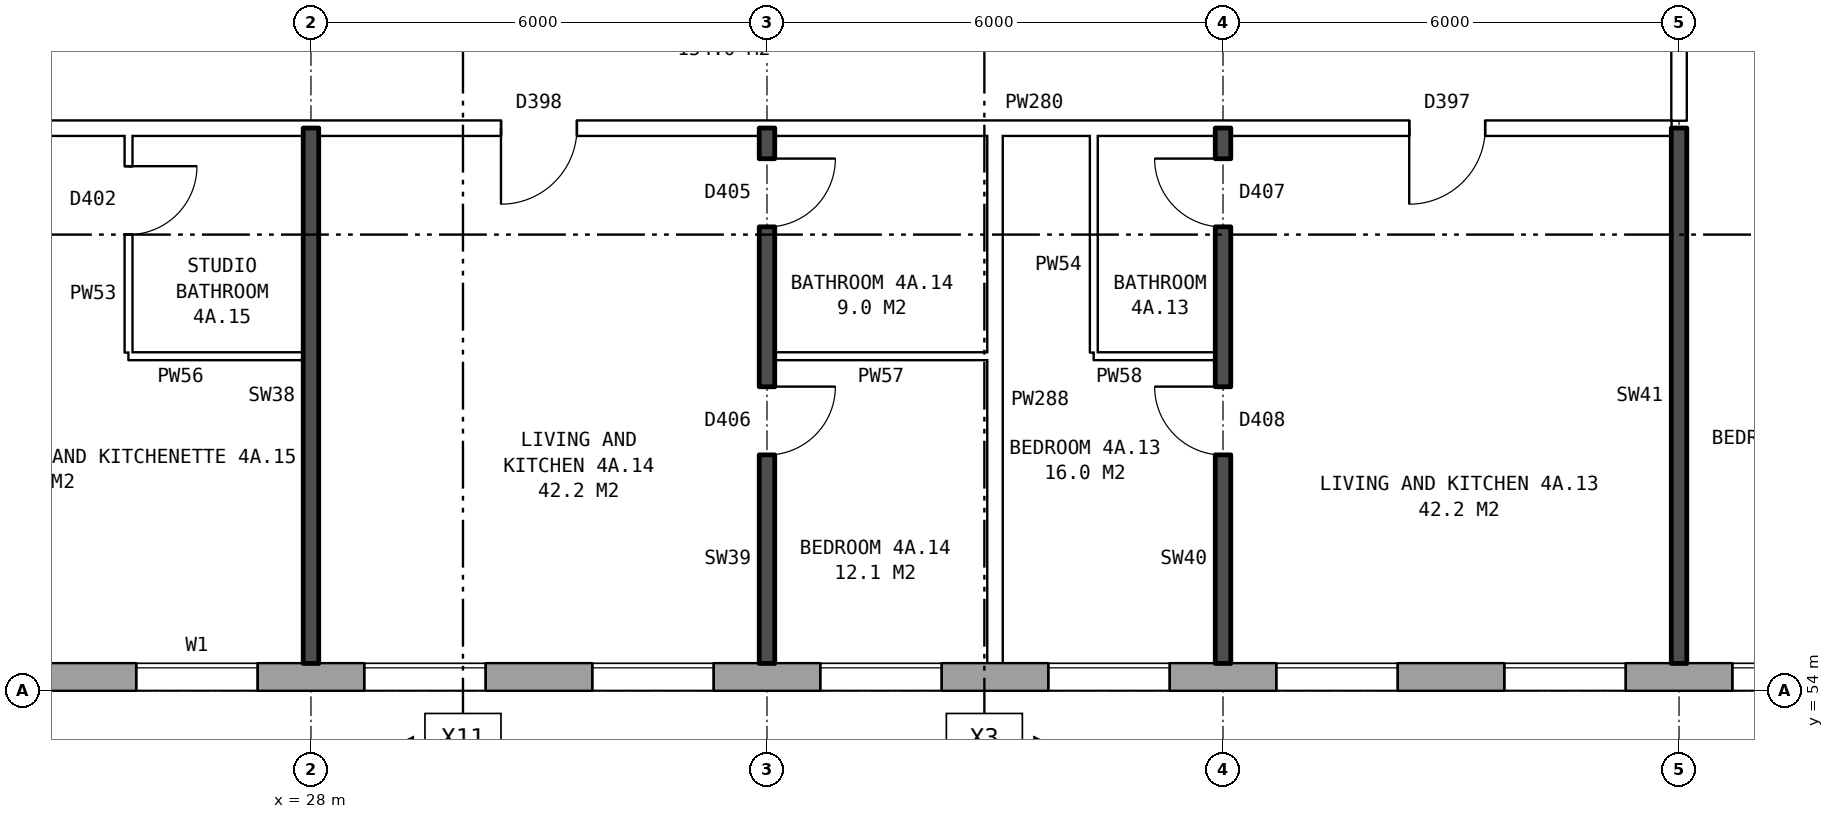
"""IFC4 building model, lengths in metres.
Left out: names, types, materials, properties, quantities, classifications, styles, units other than length and angle.
Written with IfcOpenShell. Run it as: python <this file> out.ifc"""

import sys

from ifc_helpers import new_model, si_unit, direction, frame, frame_2d, origin, place, context, subcontext, project, spatial, rectangle, extrude, element, fill, save


model = new_model("IFC4")
c1 = context("Model", 3, precision=1e-05, world=origin(), true_north=direction((0.0, 1.0)))
c2 = subcontext(c1, "Body", "Model", "MODEL_VIEW")
j1 = project(units=[si_unit("LENGTHUNIT", "METRE"), si_unit("PLANEANGLEUNIT", "RADIAN")], contexts=[c1])
p1 = place(None, origin())
s1 = spatial("IfcSite", under=j1, at=p1, CompositionType="ELEMENT")
p2 = place(p1, origin())
s2 = spatial("IfcBuilding", under=s1, at=p2, CompositionType="ELEMENT")
p3 = place(p2, frame((0.0, 0.0, 19.5)))
s3 = spatial("IfcBuildingStorey", under=s2, at=p3, CompositionType="ELEMENT", Elevation=19.5)
p4 = place(p3, frame((22.825, 54.18, 0.0), z_axis=(0.0, 0.0, 1.0), x_axis=(1.0, 0.0, 0.0)))
e1 = element("IfcWall", 1, at=p4, inside=s3, PredefinedType="STANDARD", context=c2, shape_type="SweptSolid", body=[
    extrude(rectangle(XDim=50.101, YDim=0.36, at=frame_2d((25.05, 0.0))), origin(), (0.0, 0.0, 1.0), 2.85),
])
p5 = place(p4, frame((2.875, 0.0, 0.8)))
e2 = element("IfcOpeningElement", 2, at=p5, cuts=e1, PredefinedType="OPENING", context=c2, shape_type="SweptSolid", body=[
    extrude(rectangle(XDim=1.6, YDim=1.8, at=frame_2d((0.8, 0.9))), frame((0.0, 0.19, 0.0), z_axis=(0.0, -1.0, 0.0), x_axis=(1.0, 0.0, 0.0)), (0.0, 0.0, 1.0), 0.38),
])
p6 = place(p4, frame((5.875, 0.0, 0.8)))
e3 = element("IfcOpeningElement", 3, at=p6, cuts=e1, PredefinedType="OPENING", context=c2, shape_type="SweptSolid", body=[
    extrude(rectangle(XDim=1.6, YDim=1.8, at=frame_2d((0.8, 0.9))), frame((0.0, 0.19, 0.0), z_axis=(0.0, -1.0, 0.0), x_axis=(1.0, 0.0, 0.0)), (0.0, 0.0, 1.0), 0.38),
])
p7 = place(p4, frame((8.875, 0.0, 0.8)))
e4 = element("IfcOpeningElement", 4, at=p7, cuts=e1, PredefinedType="OPENING", context=c2, shape_type="SweptSolid", body=[
    extrude(rectangle(XDim=1.6, YDim=1.8, at=frame_2d((0.8, 0.9))), frame((0.0, 0.19, 0.0), z_axis=(0.0, -1.0, 0.0), x_axis=(1.0, 0.0, 0.0)), (0.0, 0.0, 1.0), 0.38),
])
p8 = place(p4, frame((11.875, 0.0, 0.8)))
e5 = element("IfcOpeningElement", 5, at=p8, cuts=e1, PredefinedType="OPENING", context=c2, shape_type="SweptSolid", body=[
    extrude(rectangle(XDim=1.6, YDim=1.8, at=frame_2d((0.8, 0.9))), frame((0.0, 0.19, 0.0), z_axis=(0.0, -1.0, 0.0), x_axis=(1.0, 0.0, 0.0)), (0.0, 0.0, 1.0), 0.38),
])
p9 = place(p4, frame((14.875, 0.0, 0.8)))
e6 = element("IfcOpeningElement", 6, at=p9, cuts=e1, PredefinedType="OPENING", context=c2, shape_type="SweptSolid", body=[
    extrude(rectangle(XDim=1.6, YDim=1.8, at=frame_2d((0.8, 0.9))), frame((0.0, 0.19, 0.0), z_axis=(0.0, -1.0, 0.0), x_axis=(1.0, 0.0, 0.0)), (0.0, 0.0, 1.0), 0.38),
])
p10 = place(p4, frame((17.875, 0.0, 0.8)))
e7 = element("IfcOpeningElement", 7, at=p10, cuts=e1, PredefinedType="OPENING", context=c2, shape_type="SweptSolid", body=[
    extrude(rectangle(XDim=1.6, YDim=1.8, at=frame_2d((0.8, 0.9))), frame((0.0, 0.19, 0.0), z_axis=(0.0, -1.0, 0.0), x_axis=(1.0, 0.0, 0.0)), (0.0, 0.0, 1.0), 0.38),
])
p11 = place(p4, frame((20.875, 0.0, 0.8)))
e8 = element("IfcOpeningElement", 8, at=p11, cuts=e1, PredefinedType="OPENING", context=c2, shape_type="SweptSolid", body=[
    extrude(rectangle(XDim=1.6, YDim=1.8, at=frame_2d((0.8, 0.9))), frame((0.0, 0.19, 0.0), z_axis=(0.0, -1.0, 0.0), x_axis=(1.0, 0.0, 0.0)), (0.0, 0.0, 1.0), 0.38),
])
p12 = place(p4, frame((23.875, 0.0, 0.8)))
e9 = element("IfcOpeningElement", 9, at=p12, cuts=e1, PredefinedType="OPENING", context=c2, shape_type="SweptSolid", body=[
    extrude(rectangle(XDim=1.6, YDim=1.8, at=frame_2d((0.8, 0.9))), frame((0.0, 0.19, 0.0), z_axis=(0.0, -1.0, 0.0), x_axis=(1.0, 0.0, 0.0)), (0.0, 0.0, 1.0), 0.38),
])
p13 = place(p4, frame((26.875, 0.0, 0.8)))
e10 = element("IfcOpeningElement", 10, at=p13, cuts=e1, PredefinedType="OPENING", context=c2, shape_type="SweptSolid", body=[
    extrude(rectangle(XDim=1.6, YDim=1.8, at=frame_2d((0.8, 0.9))), frame((0.0, 0.19, 0.0), z_axis=(0.0, -1.0, 0.0), x_axis=(1.0, 0.0, 0.0)), (0.0, 0.0, 1.0), 0.38),
])
p14 = place(p4, frame((29.875, 0.0, 0.8)))
e11 = element("IfcOpeningElement", 11, at=p14, cuts=e1, PredefinedType="OPENING", context=c2, shape_type="SweptSolid", body=[
    extrude(rectangle(XDim=1.6, YDim=1.8, at=frame_2d((0.8, 0.9))), frame((0.0, 0.19, 0.0), z_axis=(0.0, -1.0, 0.0), x_axis=(1.0, 0.0, 0.0)), (0.0, 0.0, 1.0), 0.38),
])
p15 = place(p4, frame((32.875, 0.0, 0.8)))
e12 = element("IfcOpeningElement", 12, at=p15, cuts=e1, PredefinedType="OPENING", context=c2, shape_type="SweptSolid", body=[
    extrude(rectangle(XDim=1.6, YDim=1.8, at=frame_2d((0.8, 0.9))), frame((0.0, 0.19, 0.0), z_axis=(0.0, -1.0, 0.0), x_axis=(1.0, 0.0, 0.0)), (0.0, 0.0, 1.0), 0.38),
])
p16 = place(p4, frame((35.875, 0.0, 0.8)))
e13 = element("IfcOpeningElement", 13, at=p16, cuts=e1, PredefinedType="OPENING", context=c2, shape_type="SweptSolid", body=[
    extrude(rectangle(XDim=1.6, YDim=1.8, at=frame_2d((0.8, 0.9))), frame((0.0, 0.19, 0.0), z_axis=(0.0, -1.0, 0.0), x_axis=(1.0, 0.0, 0.0)), (0.0, 0.0, 1.0), 0.38),
])
p17 = place(p4, frame((38.875, 0.0, 0.8)))
e14 = element("IfcOpeningElement", 14, at=p17, cuts=e1, PredefinedType="OPENING", context=c2, shape_type="SweptSolid", body=[
    extrude(rectangle(XDim=1.6, YDim=1.8, at=frame_2d((0.8, 0.9))), frame((0.0, 0.19, 0.0), z_axis=(0.0, -1.0, 0.0), x_axis=(1.0, 0.0, 0.0)), (0.0, 0.0, 1.0), 0.38),
])
p18 = place(p4, frame((41.875, 0.0, 0.8)))
e15 = element("IfcOpeningElement", 15, at=p18, cuts=e1, PredefinedType="OPENING", context=c2, shape_type="SweptSolid", body=[
    extrude(rectangle(XDim=1.6, YDim=1.8, at=frame_2d((0.8, 0.9))), frame((0.0, 0.19, 0.0), z_axis=(0.0, -1.0, 0.0), x_axis=(1.0, 0.0, 0.0)), (0.0, 0.0, 1.0), 0.38),
])
p19 = place(p4, frame((44.875, 0.0, 0.8)))
e16 = element("IfcOpeningElement", 16, at=p19, cuts=e1, PredefinedType="OPENING", context=c2, shape_type="SweptSolid", body=[
    extrude(rectangle(XDim=1.6, YDim=1.8, at=frame_2d((0.8, 0.9))), frame((0.0, 0.19, 0.0), z_axis=(0.0, -1.0, 0.0), x_axis=(1.0, 0.0, 0.0)), (0.0, 0.0, 1.0), 0.38),
])
p20 = place(p4, frame((47.375, 0.0, 0.8)))
e17 = element("IfcOpeningElement", 17, at=p20, cuts=e1, PredefinedType="OPENING", context=c2, shape_type="SweptSolid", body=[
    extrude(rectangle(XDim=1.0, YDim=1.5, at=frame_2d((0.5, 0.75))), frame((0.0, 0.19, 0.0), z_axis=(0.0, -1.0, 0.0), x_axis=(1.0, 0.0, 0.0)), (0.0, 0.0, 1.0), 0.38),
])
p21 = place(p4, frame((48.675, 0.0, 0.8)))
e18 = element("IfcOpeningElement", 18, at=p21, cuts=e1, PredefinedType="OPENING", context=c2, shape_type="SweptSolid", body=[
    extrude(rectangle(XDim=0.6, YDim=0.9, at=frame_2d((0.3, 0.45))), frame((0.0, 0.19, 0.0), z_axis=(0.0, -1.0, 0.0), x_axis=(1.0, 0.0, 0.0)), (0.0, 0.0, 1.0), 0.38),
])
p22 = place(p3, frame((25.6, 58.4, 0.0), z_axis=(0.0, 0.0, 1.0), x_axis=(1.0, 0.0, 0.0)))
e19 = element("IfcWall", 19, at=p22, inside=s3, PredefinedType="PARTITIONING", context=c2, shape_type="SweptSolid", body=[
    extrude(rectangle(XDim=2.3, YDim=0.1, at=frame_2d((1.15, 0.0))), origin(), (0.0, 0.0, 1.0), 2.85),
])
p23 = place(p3, frame((34.1, 58.4, 0.0), z_axis=(0.0, 0.0, 1.0), x_axis=(1.0, 0.0, 0.0)))
e20 = element("IfcWall", 20, at=p23, inside=s3, PredefinedType="PARTITIONING", context=c2, shape_type="SweptSolid", body=[
    extrude(rectangle(XDim=2.8, YDim=0.1, at=frame_2d((1.4, 0.0))), origin(), (0.0, 0.0, 1.0), 2.85),
])
p24 = place(p3, frame((38.3, 58.4, 0.0), z_axis=(0.0, 0.0, 1.0), x_axis=(1.0, 0.0, 0.0)))
e21 = element("IfcWall", 21, at=p24, inside=s3, PredefinedType="PARTITIONING", context=c2, shape_type="SweptSolid", body=[
    extrude(rectangle(XDim=1.6, YDim=0.1, at=frame_2d((0.8, 0.0))), origin(), (0.0, 0.0, 1.0), 2.85),
])
p25 = place(p3, frame((20.11, 61.4, 0.0), z_axis=(0.0, 0.0, 1.0), x_axis=(1.0, 0.0, 0.0)))
e22 = element("IfcWall", 22, at=p25, inside=s3, PredefinedType="PARTITIONING", context=c2, shape_type="SweptSolid", body=[
    extrude(rectangle(XDim=25.79, YDim=0.2, at=frame_2d((12.895, 0.0))), origin(), (0.0, 0.0, 1.0), 2.85),
])
p26 = place(p25, frame((22.34, 0.0, 0.0)))
e23 = element("IfcOpeningElement", 23, at=p26, cuts=e22, PredefinedType="OPENING", context=c2, shape_type="SweptSolid", body=[
    extrude(rectangle(XDim=1.0, YDim=2.1, at=frame_2d((0.5, 1.05))), frame((0.0, 0.11, 0.0), z_axis=(0.0, -1.0, 0.0), x_axis=(1.0, 0.0, 0.0)), (0.0, 0.0, 1.0), 0.22),
])
p27 = place(p25, frame((10.39, 0.0, 0.0)))
e24 = element("IfcOpeningElement", 24, at=p27, cuts=e22, PredefinedType="OPENING", context=c2, shape_type="SweptSolid", body=[
    extrude(rectangle(XDim=1.0, YDim=2.1, at=frame_2d((0.5, 1.05))), frame((0.0, 0.11, 0.0), z_axis=(0.0, -1.0, 0.0), x_axis=(1.0, 0.0, 0.0)), (0.0, 0.0, 1.0), 0.22),
])
p28 = place(p25, frame((2.245, 0.0, 0.0)))
e25 = element("IfcOpeningElement", 25, at=p28, cuts=e22, PredefinedType="OPENING", context=c2, shape_type="SweptSolid", body=[
    extrude(rectangle(XDim=1.0, YDim=2.1, at=frame_2d((0.5, 1.05))), frame((0.0, 0.11, 0.0), z_axis=(0.0, -1.0, 0.0), x_axis=(1.0, 0.0, 0.0)), (0.0, 0.0, 1.0), 0.22),
])
p29 = place(p3, frame((25.6, 58.45, 0.0), z_axis=(0.0, 0.0, 1.0), x_axis=(0.0, 1.0, 0.0)))
e26 = element("IfcWall", 26, at=p29, inside=s3, PredefinedType="PARTITIONING", context=c2, shape_type="SweptSolid", body=[
    extrude(rectangle(XDim=2.85, YDim=0.1, at=frame_2d((1.425, 0.0))), origin(), (0.0, 0.0, 1.0), 2.85),
])
p30 = place(p29, frame((1.55, 0.0, 0.0)))
e27 = element("IfcOpeningElement", 27, at=p30, cuts=e26, PredefinedType="OPENING", context=c2, shape_type="SweptSolid", body=[
    extrude(rectangle(XDim=0.9, YDim=2.1, at=frame_2d((0.45, 1.05))), frame((0.0, 0.06, 0.0), z_axis=(0.0, -1.0, 0.0), x_axis=(1.0, 0.0, 0.0)), (0.0, 0.0, 1.0), 0.12),
])
p31 = place(p3, frame((28.0, 54.36, 0.0), z_axis=(0.0, 0.0, 1.0), x_axis=(0.0, 1.0, 0.0)))
e28 = element("IfcWall", 28, at=p31, inside=s3, PredefinedType="SOLIDWALL", context=c2, shape_type="SweptSolid", body=[
    extrude(rectangle(XDim=7.04, YDim=0.2, at=frame_2d((3.52, 0.0))), origin(), (0.0, 0.0, 1.0), 2.85),
])
p32 = place(p3, frame((34.0, 54.36, 0.0), z_axis=(0.0, 0.0, 1.0), x_axis=(0.0, 1.0, 0.0)))
e29 = element("IfcWall", 29, at=p32, inside=s3, PredefinedType="SOLIDWALL", context=c2, shape_type="SweptSolid", body=[
    extrude(rectangle(XDim=7.04, YDim=0.2, at=frame_2d((3.52, 0.0))), origin(), (0.0, 0.0, 1.0), 2.85),
])
p33 = place(p32, frame((2.74, 0.0, 0.0)))
e30 = element("IfcOpeningElement", 30, at=p33, cuts=e29, PredefinedType="OPENING", context=c2, shape_type="SweptSolid", body=[
    extrude(rectangle(XDim=0.9, YDim=2.1, at=frame_2d((0.45, 1.05))), frame((0.0, 0.11, 0.0), z_axis=(0.0, -1.0, 0.0), x_axis=(1.0, 0.0, 0.0)), (0.0, 0.0, 1.0), 0.22),
])
p34 = place(p32, frame((5.74, 0.0, 0.0)))
e31 = element("IfcOpeningElement", 31, at=p34, cuts=e29, PredefinedType="OPENING", context=c2, shape_type="SweptSolid", body=[
    extrude(rectangle(XDim=0.9, YDim=2.1, at=frame_2d((0.45, 1.05))), frame((0.0, 0.11, 0.0), z_axis=(0.0, -1.0, 0.0), x_axis=(1.0, 0.0, 0.0)), (0.0, 0.0, 1.0), 0.22),
])
p35 = place(p3, frame((37.0, 54.36, 0.0), z_axis=(0.0, 0.0, 1.0), x_axis=(0.0, 1.0, 0.0)))
e32 = element("IfcWall", 32, at=p35, inside=s3, PredefinedType="PARTITIONING", context=c2, shape_type="SweptSolid", body=[
    extrude(rectangle(XDim=6.94, YDim=0.2, at=frame_2d((3.47, 0.0))), origin(), (0.0, 0.0, 1.0), 2.85),
])
p36 = place(p3, frame((38.3, 58.45, 0.0), z_axis=(0.0, 0.0, 1.0), x_axis=(0.0, 1.0, 0.0)))
e33 = element("IfcWall", 33, at=p36, inside=s3, PredefinedType="PARTITIONING", context=c2, shape_type="SweptSolid", body=[
    extrude(rectangle(XDim=2.85, YDim=0.1, at=frame_2d((1.425, 0.0))), origin(), (0.0, 0.0, 1.0), 2.85),
])
p37 = place(p3, frame((40.0, 54.36, 0.0), z_axis=(0.0, 0.0, 1.0), x_axis=(0.0, 1.0, 0.0)))
e34 = element("IfcWall", 34, at=p37, inside=s3, PredefinedType="SOLIDWALL", context=c2, shape_type="SweptSolid", body=[
    extrude(rectangle(XDim=7.04, YDim=0.2, at=frame_2d((3.52, 0.0))), origin(), (0.0, 0.0, 1.0), 2.85),
])
p38 = place(p37, frame((2.74, 0.0, 0.0)))
e35 = element("IfcOpeningElement", 35, at=p38, cuts=e34, PredefinedType="OPENING", context=c2, shape_type="SweptSolid", body=[
    extrude(rectangle(XDim=0.9, YDim=2.1, at=frame_2d((0.45, 1.05))), frame((0.0, 0.11, 0.0), z_axis=(0.0, -1.0, 0.0), x_axis=(1.0, 0.0, 0.0)), (0.0, 0.0, 1.0), 0.22),
])
p39 = place(p37, frame((5.74, 0.0, 0.0)))
e36 = element("IfcOpeningElement", 36, at=p39, cuts=e34, PredefinedType="OPENING", context=c2, shape_type="SweptSolid", body=[
    extrude(rectangle(XDim=0.9, YDim=2.1, at=frame_2d((0.45, 1.05))), frame((0.0, 0.11, 0.0), z_axis=(0.0, -1.0, 0.0), x_axis=(1.0, 0.0, 0.0)), (0.0, 0.0, 1.0), 0.22),
])
p40 = place(p3, frame((46.0, 54.36, 0.0), z_axis=(0.0, 0.0, 1.0), x_axis=(0.0, 1.0, 0.0)))
e37 = element("IfcWall", 37, at=p40, inside=s3, PredefinedType="SOLIDWALL", context=c2, shape_type="SweptSolid", body=[
    extrude(rectangle(XDim=7.04, YDim=0.2, at=frame_2d((3.52, 0.0))), origin(), (0.0, 0.0, 1.0), 2.85),
])
p41 = place(p3, frame((46.0, 61.5, 0.0), z_axis=(0.0, 0.0, 1.0), x_axis=(0.0, 1.0, 0.0)))
e38 = element("IfcWall", 38, at=p41, inside=s3, PredefinedType="PARTITIONING", context=c2, shape_type="SweptSolid", body=[
    extrude(rectangle(XDim=2.2, YDim=0.2, at=frame_2d((1.1, 0.0))), origin(), (0.0, 0.0, 1.0), 2.85),
])
p42 = place(p5, origin())
e39 = element("IfcWindow", 39, at=p42, inside=s3, PartitioningType="SINGLE_PANEL", PredefinedType="WINDOW", context=c2, shape_type="SweptSolid", body=[
    extrude(rectangle(XDim=1.6, YDim=1.8, at=frame_2d((0.8, 0.9))), frame((0.0, 0.15, 0.0), z_axis=(0.0, -1.0, 0.0), x_axis=(1.0, 0.0, 0.0)), (0.0, 0.0, 1.0), 0.06),
])
fill(e2, e39)
p43 = place(p6, origin())
e40 = element("IfcWindow", 40, at=p43, inside=s3, PartitioningType="SINGLE_PANEL", PredefinedType="WINDOW", context=c2, shape_type="SweptSolid", body=[
    extrude(rectangle(XDim=1.6, YDim=1.8, at=frame_2d((0.8, 0.9))), frame((0.0, 0.15, 0.0), z_axis=(0.0, -1.0, 0.0), x_axis=(1.0, 0.0, 0.0)), (0.0, 0.0, 1.0), 0.06),
])
fill(e3, e40)
p44 = place(p7, origin())
e41 = element("IfcWindow", 41, at=p44, inside=s3, PartitioningType="SINGLE_PANEL", PredefinedType="WINDOW", context=c2, shape_type="SweptSolid", body=[
    extrude(rectangle(XDim=1.6, YDim=1.8, at=frame_2d((0.8, 0.9))), frame((0.0, 0.15, 0.0), z_axis=(0.0, -1.0, 0.0), x_axis=(1.0, 0.0, 0.0)), (0.0, 0.0, 1.0), 0.06),
])
fill(e4, e41)
p45 = place(p8, origin())
e42 = element("IfcWindow", 42, at=p45, inside=s3, PartitioningType="SINGLE_PANEL", PredefinedType="WINDOW", context=c2, shape_type="SweptSolid", body=[
    extrude(rectangle(XDim=1.6, YDim=1.8, at=frame_2d((0.8, 0.9))), frame((0.0, 0.15, 0.0), z_axis=(0.0, -1.0, 0.0), x_axis=(1.0, 0.0, 0.0)), (0.0, 0.0, 1.0), 0.06),
])
fill(e5, e42)
p46 = place(p9, origin())
e43 = element("IfcWindow", 43, at=p46, inside=s3, PartitioningType="SINGLE_PANEL", PredefinedType="WINDOW", context=c2, shape_type="SweptSolid", body=[
    extrude(rectangle(XDim=1.6, YDim=1.8, at=frame_2d((0.8, 0.9))), frame((0.0, 0.15, 0.0), z_axis=(0.0, -1.0, 0.0), x_axis=(1.0, 0.0, 0.0)), (0.0, 0.0, 1.0), 0.06),
])
fill(e6, e43)
p47 = place(p10, origin())
e44 = element("IfcWindow", 44, at=p47, inside=s3, PartitioningType="SINGLE_PANEL", PredefinedType="WINDOW", context=c2, shape_type="SweptSolid", body=[
    extrude(rectangle(XDim=1.6, YDim=1.8, at=frame_2d((0.8, 0.9))), frame((0.0, 0.15, 0.0), z_axis=(0.0, -1.0, 0.0), x_axis=(1.0, 0.0, 0.0)), (0.0, 0.0, 1.0), 0.06),
])
fill(e7, e44)
p48 = place(p11, origin())
e45 = element("IfcWindow", 45, at=p48, inside=s3, PartitioningType="SINGLE_PANEL", PredefinedType="WINDOW", context=c2, shape_type="SweptSolid", body=[
    extrude(rectangle(XDim=1.6, YDim=1.8, at=frame_2d((0.8, 0.9))), frame((0.0, 0.15, 0.0), z_axis=(0.0, -1.0, 0.0), x_axis=(1.0, 0.0, 0.0)), (0.0, 0.0, 1.0), 0.06),
])
fill(e8, e45)
p49 = place(p12, origin())
e46 = element("IfcWindow", 46, at=p49, inside=s3, PartitioningType="SINGLE_PANEL", PredefinedType="WINDOW", context=c2, shape_type="SweptSolid", body=[
    extrude(rectangle(XDim=1.6, YDim=1.8, at=frame_2d((0.8, 0.9))), frame((0.0, 0.15, 0.0), z_axis=(0.0, -1.0, 0.0), x_axis=(1.0, 0.0, 0.0)), (0.0, 0.0, 1.0), 0.06),
])
fill(e9, e46)
p50 = place(p38, origin())
e47 = element("IfcDoor", 47, at=p50, inside=s3, OperationType="SINGLE_SWING_RIGHT", PredefinedType="DOOR", context=c2, shape_type="SweptSolid", body=[
    extrude(rectangle(XDim=0.9, YDim=2.1, at=frame_2d((0.45, 1.05))), frame((0.0, 0.025, 0.0), z_axis=(0.0, -1.0, 0.0), x_axis=(1.0, 0.0, 0.0)), (0.0, 0.0, 1.0), 0.05),
])
fill(e35, e47)
p51 = place(p26, frame((1.0, 0.0, 0.0), z_axis=(0.0, 0.0, 1.0), x_axis=(-1.0, 0.0, 0.0)))
e48 = element("IfcDoor", 48, at=p51, inside=s3, OperationType="SINGLE_SWING_RIGHT", PredefinedType="DOOR", context=c2, shape_type="SweptSolid", body=[
    extrude(rectangle(XDim=1.0, YDim=2.1, at=frame_2d((0.5, 1.05))), frame((0.0, 0.025, 0.0), z_axis=(0.0, -1.0, 0.0), x_axis=(1.0, 0.0, 0.0)), (0.0, 0.0, 1.0), 0.05),
])
fill(e23, e48)
p52 = place(p39, origin())
e49 = element("IfcDoor", 49, at=p52, inside=s3, OperationType="SINGLE_SWING_RIGHT", PredefinedType="DOOR", context=c2, shape_type="SweptSolid", body=[
    extrude(rectangle(XDim=0.9, YDim=2.1, at=frame_2d((0.45, 1.05))), frame((0.0, 0.025, 0.0), z_axis=(0.0, -1.0, 0.0), x_axis=(1.0, 0.0, 0.0)), (0.0, 0.0, 1.0), 0.05),
])
fill(e36, e49)
p53 = place(p33, frame((0.9, 0.0, 0.0), z_axis=(0.0, 0.0, 1.0), x_axis=(-1.0, 0.0, 0.0)))
e50 = element("IfcDoor", 50, at=p53, inside=s3, OperationType="SINGLE_SWING_LEFT", PredefinedType="DOOR", context=c2, shape_type="SweptSolid", body=[
    extrude(rectangle(XDim=0.9, YDim=2.1, at=frame_2d((0.45, 1.05))), frame((0.0, 0.025, 0.0), z_axis=(0.0, -1.0, 0.0), x_axis=(1.0, 0.0, 0.0)), (0.0, 0.0, 1.0), 0.05),
])
fill(e30, e50)
p54 = place(p27, frame((1.0, 0.0, 0.0), z_axis=(0.0, 0.0, 1.0), x_axis=(-1.0, 0.0, 0.0)))
e51 = element("IfcDoor", 51, at=p54, inside=s3, OperationType="SINGLE_SWING_RIGHT", PredefinedType="DOOR", context=c2, shape_type="SweptSolid", body=[
    extrude(rectangle(XDim=1.0, YDim=2.1, at=frame_2d((0.5, 1.05))), frame((0.0, 0.025, 0.0), z_axis=(0.0, -1.0, 0.0), x_axis=(1.0, 0.0, 0.0)), (0.0, 0.0, 1.0), 0.05),
])
fill(e24, e51)
p55 = place(p34, frame((0.9, 0.0, 0.0), z_axis=(0.0, 0.0, 1.0), x_axis=(-1.0, 0.0, 0.0)))
e52 = element("IfcDoor", 52, at=p55, inside=s3, OperationType="SINGLE_SWING_LEFT", PredefinedType="DOOR", context=c2, shape_type="SweptSolid", body=[
    extrude(rectangle(XDim=0.9, YDim=2.1, at=frame_2d((0.45, 1.05))), frame((0.0, 0.025, 0.0), z_axis=(0.0, -1.0, 0.0), x_axis=(1.0, 0.0, 0.0)), (0.0, 0.0, 1.0), 0.05),
])
fill(e31, e52)
p56 = place(p30, frame((0.9, 0.0, 0.0), z_axis=(0.0, 0.0, 1.0), x_axis=(-1.0, 0.0, 0.0)))
e53 = element("IfcDoor", 53, at=p56, inside=s3, OperationType="SINGLE_SWING_LEFT", PredefinedType="DOOR", context=c2, shape_type="SweptSolid", body=[
    extrude(rectangle(XDim=0.9, YDim=2.1, at=frame_2d((0.45, 1.05))), frame((0.0, 0.025, 0.0), z_axis=(0.0, -1.0, 0.0), x_axis=(1.0, 0.0, 0.0)), (0.0, 0.0, 1.0), 0.05),
])
fill(e27, e53)
save(model, sys.argv[1])
